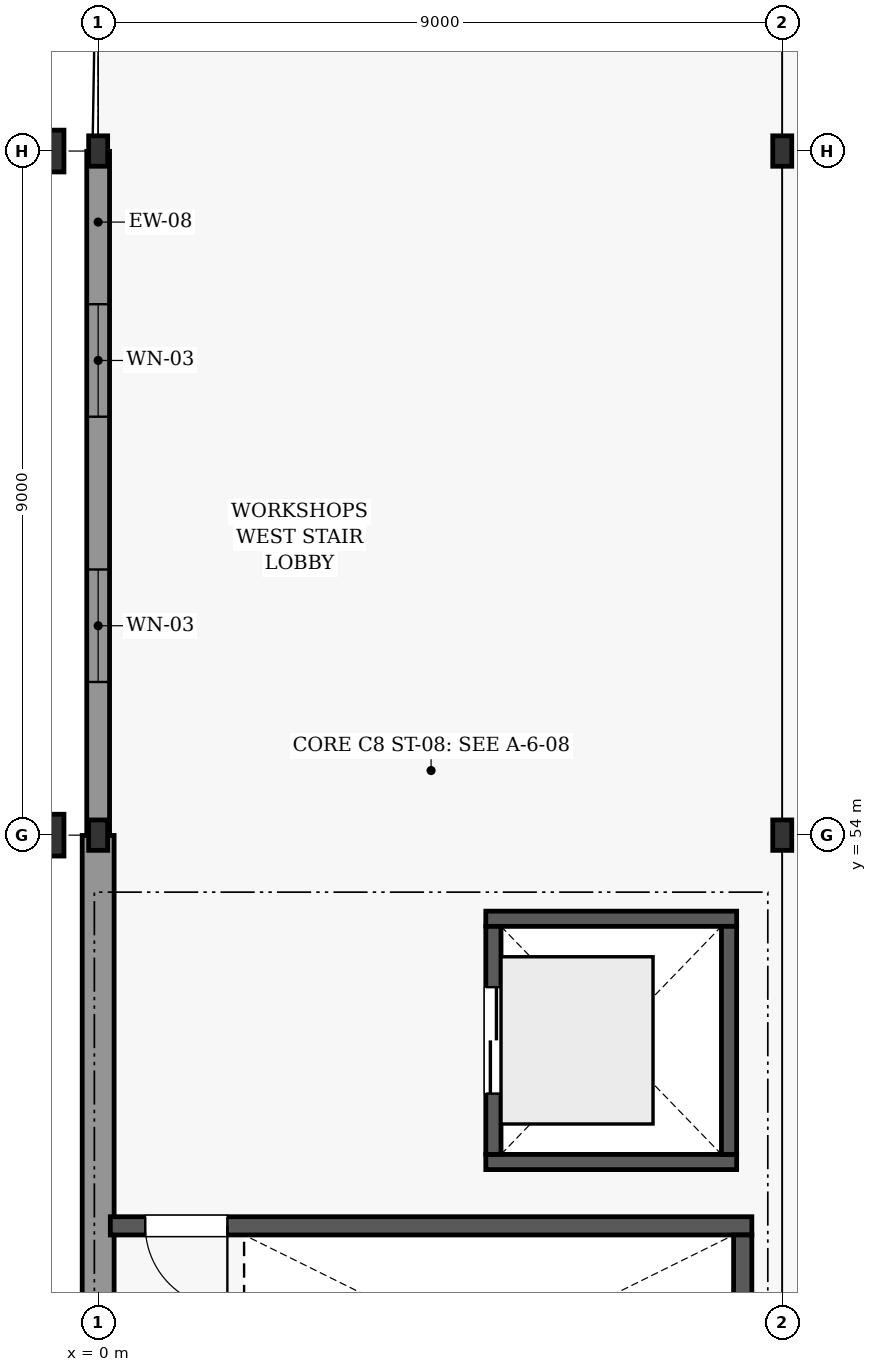
"""IFC4 building model, lengths in metres.
Left out: names, types, materials, properties, quantities, classifications, styles, units other than length and angle.
Written with IfcOpenShell. Run it as: python <this file> out.ifc"""

import sys

from ifc_helpers import new_model, si_unit, direction, frame, frame_2d, origin, origin_2d, place, context, subcontext, project, spatial, rectangle, i_section, extrude, element, fill, save


model = new_model("IFC4")
c1 = context("Model", 3, precision=1e-05, world=origin(), true_north=direction((0.0, 1.0)))
c2 = subcontext(c1, "Body", "Model", "MODEL_VIEW")
j1 = project(units=[si_unit("LENGTHUNIT", "METRE"), si_unit("PLANEANGLEUNIT", "RADIAN")], contexts=[c1])
p1 = place(None, origin())
s1 = spatial("IfcSite", under=j1, at=p1, CompositionType="ELEMENT")
p2 = place(p1, origin())
s2 = spatial("IfcBuilding", under=s1, at=p2, CompositionType="ELEMENT")
p3 = place(p2, frame((0.0, 0.0, 4.8)))
s3 = spatial("IfcBuildingStorey", under=s2, at=p3, CompositionType="ELEMENT", Elevation=4.8)
for number, where, z_axis, x_axis in (
    (1, (0.0, 54.0, 0.0), (0.0, 0.0, 1.0), (1.0, 0.0, 0.0)),
    (2, (0.0, 63.0, 0.0), (0.0, 0.0, 1.0), (1.0, 0.0, 0.0)),
    (3, (9.0, 54.0, 0.0), (0.0, 0.0, 1.0), (1.0, 0.0, 0.0)),
    (4, (9.0, 63.0, 0.0), (0.0, 0.0, 1.0), (1.0, 0.0, 0.0)),
):
    element("IfcColumn", number, at=place(p3, frame(where, z_axis=z_axis, x_axis=x_axis)), inside=s3, PredefinedType="COLUMN", context=c2, shape_type="SweptSolid", body=[
        extrude(i_section(OverallWidth=0.25, OverallDepth=0.4, WebThickness=0.01, FlangeThickness=0.013, FilletRadius=0.014, at=origin_2d()), origin(), (0.0, 0.0, 1.0), 3.6),
    ])
for number, where, z_axis, x_axis in (
    (5, (-0.85, 54.0, 0.0), (0.0, 0.0, 1.0), (0.0, 1.0, 0.0)),
    (6, (-0.85, 63.0, 0.0), (0.0, 0.0, 1.0), (0.0, 1.0, 0.0)),
):
    element("IfcColumn", number, at=place(p3, frame(where, z_axis=z_axis, x_axis=x_axis)), inside=s3, PredefinedType="PILASTER", context=c2, shape_type="SweptSolid", body=[
        extrude(rectangle(XDim=0.55, YDim=0.8, at=origin_2d()), origin(), (0.0, 0.0, 1.0), 3.6),
    ])
p4 = place(p3, frame((0.0, 45.004, 0.0), z_axis=(0.0, 0.0, 1.0), x_axis=(0.0, 1.0, 0.0)))
e7 = element("IfcWall", 7, at=p4, inside=s3, PredefinedType="SOLIDWALL", context=c2, shape_type="SweptSolid", body=[
    extrude(rectangle(XDim=8.992, YDim=0.42, at=frame_2d((4.496, 0.0))), origin(), (0.0, 0.0, 1.0), 2.702),
])
p5 = place(p3, frame((0.0, 54.004, 0.0), z_axis=(0.0, 0.0, 1.0), x_axis=(0.0, 1.0, 0.0)))
e8 = element("IfcWall", 8, at=p5, inside=s3, PredefinedType="SOLIDWALL", context=c2, shape_type="SweptSolid", body=[
    extrude(rectangle(XDim=8.992, YDim=0.3, at=frame_2d((4.496, 0.0))), origin(), (0.0, 0.0, 1.0), 2.742),
])
p6 = place(p5, frame((2.011, 0.0, 0.85)))
e9 = element("IfcOpeningElement", 9, at=p6, cuts=e8, PredefinedType="OPENING", context=c2, shape_type="SweptSolid", body=[
    extrude(rectangle(XDim=1.48, YDim=1.56, at=frame_2d((0.74, 0.78))), frame((0.0, 0.16, 0.0), z_axis=(0.0, -1.0, 0.0), x_axis=(1.0, 0.0, 0.0)), (0.0, 0.0, 1.0), 0.32),
])
p7 = place(p5, frame((5.501, 0.0, 0.85)))
e10 = element("IfcOpeningElement", 10, at=p7, cuts=e8, PredefinedType="OPENING", context=c2, shape_type="SweptSolid", body=[
    extrude(rectangle(XDim=1.48, YDim=1.56, at=frame_2d((0.74, 0.78))), frame((0.0, 0.16, 0.0), z_axis=(0.0, -1.0, 0.0), x_axis=(1.0, 0.0, 0.0)), (0.0, 0.0, 1.0), 0.32),
])
p8 = place(p3, frame((0.16, 48.86, 0.0), z_axis=(0.0, 0.0, 1.0), x_axis=(1.0, 0.0, 0.0)))
e11 = element("IfcWall", 11, at=p8, inside=s3, PredefinedType="SHEAR", context=c2, shape_type="SweptSolid", body=[
    extrude(rectangle(XDim=8.44, YDim=0.24, at=frame_2d((4.22, 0.0))), origin(), (0.0, 0.0, 1.0), 3.35),
])
p9 = place(p8, frame((0.46, 0.0, 0.0)))
e12 = element("IfcOpeningElement", 12, at=p9, cuts=e11, PredefinedType="OPENING", context=c2, shape_type="SweptSolid", body=[
    extrude(rectangle(XDim=1.08, YDim=2.08, at=frame_2d((0.54, 1.04))), frame((0.0, 0.13, 0.0), z_axis=(0.0, -1.0, 0.0), x_axis=(1.0, 0.0, 0.0)), (0.0, 0.0, 1.0), 0.26),
])
p10 = place(p3, frame((8.48, 45.55, 0.0), z_axis=(0.0, 0.0, 1.0), x_axis=(0.0, 1.0, 0.0)))
e13 = element("IfcWall", 13, at=p10, inside=s3, PredefinedType="SHEAR", context=c2, shape_type="SweptSolid", body=[
    extrude(rectangle(XDim=3.19, YDim=0.24, at=frame_2d((1.595, 0.0))), origin(), (0.0, 0.0, 1.0), 3.35),
])
for number, where, z_axis, x_axis in (
    (14, (5.1, 49.7, 0.0), (0.0, 0.0, 1.0), (1.0, 0.0, 0.0)),
    (15, (5.1, 52.9, 0.0), (0.0, 0.0, 1.0), (1.0, 0.0, 0.0)),
):
    element("IfcWall", number, at=place(p3, frame(where, z_axis=z_axis, x_axis=x_axis)), inside=s3, PredefinedType="SHEAR", context=c2, shape_type="SweptSolid", body=[
        extrude(rectangle(XDim=3.3, YDim=0.2, at=frame_2d((1.65, 0.0))), origin(), (0.0, 0.0, 1.0), 3.35),
    ])
p11 = place(p3, frame((5.2, 49.8, 0.0), z_axis=(0.0, 0.0, 1.0), x_axis=(0.0, 1.0, 0.0)))
e16 = element("IfcWall", 16, at=p11, inside=s3, PredefinedType="SHEAR", context=c2, shape_type="SweptSolid", body=[
    extrude(rectangle(XDim=3.0, YDim=0.2, at=frame_2d((1.5, 0.0))), origin(), (0.0, 0.0, 1.0), 3.35),
])
p12 = place(p11, frame((0.8, 0.0, 0.0)))
e17 = element("IfcOpeningElement", 17, at=p12, cuts=e16, PredefinedType="OPENING", context=c2, shape_type="SweptSolid", body=[
    extrude(rectangle(XDim=1.4, YDim=2.15, at=frame_2d((0.7, 1.075))), frame((0.0, 0.11, 0.0), z_axis=(0.0, -1.0, 0.0), x_axis=(1.0, 0.0, 0.0)), (0.0, 0.0, 1.0), 0.22),
])
p13 = place(p3, frame((8.3, 49.8, 0.0), z_axis=(0.0, 0.0, 1.0), x_axis=(0.0, 1.0, 0.0)))
e18 = element("IfcWall", 18, at=p13, inside=s3, PredefinedType="SHEAR", context=c2, shape_type="SweptSolid", body=[
    extrude(rectangle(XDim=3.0, YDim=0.2, at=frame_2d((1.5, 0.0))), origin(), (0.0, 0.0, 1.0), 3.35),
])
p14 = place(p6, origin())
e19 = element("IfcWindow", 19, at=p14, inside=s3, PartitioningType="SINGLE_PANEL", PredefinedType="WINDOW", context=c2, shape_type="SweptSolid", body=[
    extrude(rectangle(XDim=1.48, YDim=1.56, at=frame_2d((0.74, 0.78))), frame((0.0, 0.03, 0.0), z_axis=(0.0, -1.0, 0.0), x_axis=(1.0, 0.0, 0.0)), (0.0, 0.0, 1.0), 0.06),
])
fill(e9, e19)
p15 = place(p7, origin())
e20 = element("IfcWindow", 20, at=p15, inside=s3, PartitioningType="SINGLE_PANEL", PredefinedType="WINDOW", context=c2, shape_type="SweptSolid", body=[
    extrude(rectangle(XDim=1.48, YDim=1.56, at=frame_2d((0.74, 0.78))), frame((0.0, 0.03, 0.0), z_axis=(0.0, -1.0, 0.0), x_axis=(1.0, 0.0, 0.0)), (0.0, 0.0, 1.0), 0.06),
])
fill(e10, e20)
p16 = place(p9, frame((1.08, 0.0, 0.0), z_axis=(0.0, 0.0, 1.0), x_axis=(-1.0, 0.0, 0.0)))
e21 = element("IfcDoor", 21, at=p16, inside=s3, OperationType="SINGLE_SWING_RIGHT", PredefinedType="DOOR", context=c2, shape_type="SweptSolid", body=[
    extrude(rectangle(XDim=1.08, YDim=2.08, at=frame_2d((0.54, 1.04))), frame((0.0, 0.025, 0.0), z_axis=(0.0, -1.0, 0.0), x_axis=(1.0, 0.0, 0.0)), (0.0, 0.0, 1.0), 0.05),
])
fill(e12, e21)
p17 = place(p12, origin())
e22 = element("IfcDoor", 22, at=p17, inside=s3, OperationType="DOUBLE_DOOR_SLIDING", PredefinedType="DOOR", context=c2, shape_type="SweptSolid", body=[
    extrude(rectangle(XDim=1.4, YDim=2.15, at=frame_2d((0.7, 1.075))), frame((0.0, 0.025, 0.0), z_axis=(0.0, -1.0, 0.0), x_axis=(1.0, 0.0, 0.0)), (0.0, 0.0, 1.0), 0.05),
])
fill(e17, e22)
save(model, sys.argv[1])
